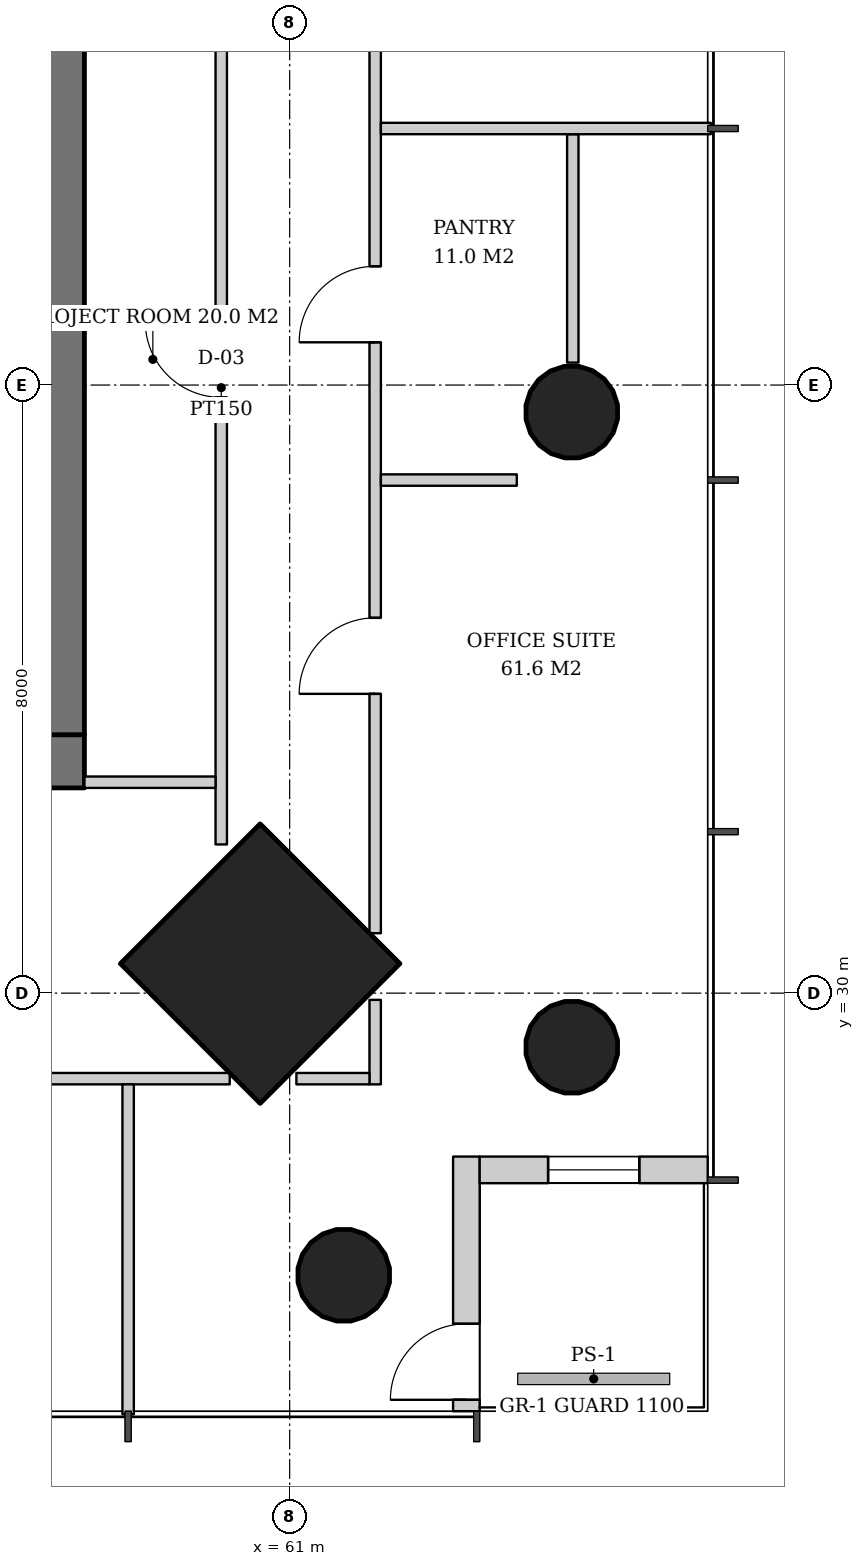
"""IFC4 building model, lengths in metres.
Left out: names, types, materials, properties, quantities, classifications, styles, units other than length and angle.
Written with IfcOpenShell. Run it as: python <this file> out.ifc"""

import sys

from ifc_helpers import new_model, si_unit, direction, frame, frame_2d, origin, origin_2d, place, context, subcontext, project, spatial, rectangle, hollow_circle, extrude, element, fill, save


model = new_model("IFC4")
c1 = context("Model", 3, precision=1e-05, world=origin(), true_north=direction((0.0, 1.0)))
c2 = subcontext(c1, "Body", "Model", "MODEL_VIEW")
j1 = project(units=[si_unit("LENGTHUNIT", "METRE"), si_unit("PLANEANGLEUNIT", "RADIAN")], contexts=[c1])
p1 = place(None, origin())
s1 = spatial("IfcSite", under=j1, at=p1, CompositionType="ELEMENT")
p2 = place(p1, origin())
s2 = spatial("IfcBuilding", under=s1, at=p2, CompositionType="ELEMENT")
p3 = place(p2, frame((0.0, 0.0, 154.0)))
s3 = spatial("IfcBuildingStorey", under=s2, at=p3, CompositionType="ELEMENT", Elevation=154.0)
p4 = place(p3, frame((64.75, 29.25, 0.0), z_axis=(-0.031898107953, 0.031898107953, 0.998981992539), x_axis=(-0.707106781187, -0.707106781187, 0.0)))
e1 = element("IfcColumn", 1, at=p4, inside=s3, PredefinedType="COLUMN", context=c2, shape_type="SweptSolid", body=[
    extrude(hollow_circle(Radius=0.61, WallThickness=0.04, at=origin_2d()), origin(), (0.0, 0.0, 1.0), 3.804),
])
p5 = place(p3, frame((64.75, 37.625, 0.0), z_axis=(-0.031910269556, 0.015987237665, 0.999362868496), x_axis=(-0.447933021895, -0.894067115991, 0.0)))
e2 = element("IfcColumn", 2, at=p5, inside=s3, PredefinedType="COLUMN", context=c2, shape_type="SweptSolid", body=[
    extrude(hollow_circle(Radius=0.61, WallThickness=0.04, at=origin_2d()), origin(), (0.0, 0.0, 1.0), 3.802),
])
p6 = place(p3, frame((60.65, 30.35, 0.0), z_axis=(-0.031898107953, 0.031898107953, 0.998981992539), x_axis=(-0.707106781187, -0.707106781187, 0.0)))
e3 = element("IfcColumn", 3, at=p6, inside=s3, PredefinedType="COLUMN", context=c2, shape_type="SweptSolid", body=[
    extrude(rectangle(XDim=2.6, YDim=2.6, at=origin_2d()), origin(), (0.0, 0.0, 1.0), 3.804),
])
p7 = place(p3, frame((61.75, 26.25, 0.0), z_axis=(-0.031898107953, 0.031898107953, 0.998981992539), x_axis=(-0.707106781187, -0.707106781187, 0.0)))
e4 = element("IfcColumn", 4, at=p7, inside=s3, PredefinedType="COLUMN", context=c2, shape_type="SweptSolid", body=[
    extrude(hollow_circle(Radius=0.61, WallThickness=0.04, at=origin_2d()), origin(), (0.0, 0.0, 1.0), 3.804),
])
p8 = place(p3, frame((31.7, 33.05, 0.0), z_axis=(0.0, 0.0, 1.0), x_axis=(1.0, 0.0, 0.0)))
e5 = element("IfcWall", 5, at=p8, inside=s3, PredefinedType="SHEAR", context=c2, shape_type="SweptSolid", body=[
    extrude(rectangle(XDim=26.6, YDim=0.7, at=frame_2d((13.3, 0.0))), origin(), (0.0, 0.0, 1.0), 3.8),
])
p9 = place(p8, frame((7.3, 0.0, 0.0)))
e6 = element("IfcOpeningElement", 6, at=p9, cuts=e5, PredefinedType="OPENING", context=c2, shape_type="SweptSolid", body=[
    extrude(rectangle(XDim=1.0, YDim=2.1, at=frame_2d((0.5, 1.05))), frame((0.0, 0.36, 0.0), z_axis=(0.0, -1.0, 0.0), x_axis=(1.0, 0.0, 0.0)), (0.0, 0.0, 1.0), 0.72),
])
p10 = place(p8, frame((18.75, 0.0, 0.0)))
e7 = element("IfcOpeningElement", 7, at=p10, cuts=e5, PredefinedType="OPENING", context=c2, shape_type="SweptSolid", body=[
    extrude(rectangle(XDim=1.0, YDim=2.1, at=frame_2d((0.5, 1.05))), frame((0.0, 0.36, 0.0), z_axis=(0.0, -1.0, 0.0), x_axis=(1.0, 0.0, 0.0)), (0.0, 0.0, 1.0), 0.72),
])
p11 = place(p8, frame((3.2, 0.0, 0.0)))
e8 = element("IfcOpeningElement", 8, at=p11, cuts=e5, PredefinedType="OPENING", context=c2, shape_type="SweptSolid", body=[
    extrude(rectangle(XDim=1.0, YDim=2.1, at=frame_2d((0.5, 1.05))), frame((0.0, 0.36, 0.0), z_axis=(0.0, -1.0, 0.0), x_axis=(1.0, 0.0, 0.0)), (0.0, 0.0, 1.0), 0.72),
])
p12 = place(p8, frame((10.42, 0.0, 0.0)))
e9 = element("IfcOpeningElement", 9, at=p12, cuts=e5, PredefinedType="OPENING", context=c2, shape_type="SweptSolid", body=[
    extrude(rectangle(XDim=1.0, YDim=2.1, at=frame_2d((0.5, 1.05))), frame((0.0, 0.36, 0.0), z_axis=(0.0, -1.0, 0.0), x_axis=(1.0, 0.0, 0.0)), (0.0, 0.0, 1.0), 0.72),
])
p13 = place(p8, frame((14.46, 0.0, 0.0)))
e10 = element("IfcOpeningElement", 10, at=p13, cuts=e5, PredefinedType="OPENING", context=c2, shape_type="SweptSolid", body=[
    extrude(rectangle(XDim=1.0, YDim=2.1, at=frame_2d((0.5, 1.05))), frame((0.0, 0.36, 0.0), z_axis=(0.0, -1.0, 0.0), x_axis=(1.0, 0.0, 0.0)), (0.0, 0.0, 1.0), 0.72),
])
p14 = place(p8, frame((22.5, 0.0, 0.0)))
e11 = element("IfcOpeningElement", 11, at=p14, cuts=e5, PredefinedType="OPENING", context=c2, shape_type="SweptSolid", body=[
    extrude(rectangle(XDim=1.0, YDim=2.1, at=frame_2d((0.5, 1.05))), frame((0.0, 0.36, 0.0), z_axis=(0.0, -1.0, 0.0), x_axis=(1.0, 0.0, 0.0)), (0.0, 0.0, 1.0), 0.72),
])
p15 = place(p3, frame((57.95, 33.4, 0.0), z_axis=(0.0, 0.0, 1.0), x_axis=(0.0, 1.0, 0.0)))
e12 = element("IfcWall", 12, at=p15, inside=s3, PredefinedType="SHEAR", context=c2, shape_type="SweptSolid", body=[
    extrude(rectangle(XDim=25.2, YDim=0.7, at=frame_2d((12.6, 0.0))), origin(), (0.0, 0.0, 1.0), 3.8),
])
p16 = place(p15, frame((11.7, 0.0, 0.0)))
e13 = element("IfcOpeningElement", 13, at=p16, cuts=e12, PredefinedType="OPENING", context=c2, shape_type="SweptSolid", body=[
    extrude(rectangle(XDim=1.8, YDim=2.4, at=frame_2d((0.9, 1.2))), frame((0.0, 0.36, 0.0), z_axis=(0.0, -1.0, 0.0), x_axis=(1.0, 0.0, 0.0)), (0.0, 0.0, 1.0), 0.72),
])
p17 = place(p3, frame((63.325, 24.5, 0.0), z_axis=(0.0, 0.0, 1.0), x_axis=(0.0, 1.0, 0.0)))
e14 = element("IfcWall", 14, at=p17, inside=s3, PredefinedType="SOLIDWALL", context=c2, shape_type="SweptSolid", body=[
    extrude(rectangle(XDim=3.35, YDim=0.35, at=frame_2d((1.675, 0.0))), origin(), (0.0, 0.0, 1.0), 3.52),
])
p18 = place(p17, frame((0.15, 0.0, 0.0)))
e15 = element("IfcOpeningElement", 15, at=p18, cuts=e14, PredefinedType="OPENING", context=c2, shape_type="SweptSolid", body=[
    extrude(rectangle(XDim=1.0, YDim=2.4, at=frame_2d((0.5, 1.2))), frame((0.0, 0.185, 0.0), z_axis=(0.0, -1.0, 0.0), x_axis=(1.0, 0.0, 0.0)), (0.0, 0.0, 1.0), 0.37),
])
p19 = place(p3, frame((63.5, 27.675, 0.0), z_axis=(0.0, 0.0, 1.0), x_axis=(1.0, 0.0, 0.0)))
e16 = element("IfcWall", 16, at=p19, inside=s3, PredefinedType="SOLIDWALL", context=c2, shape_type="SweptSolid", body=[
    extrude(rectangle(XDim=3.0, YDim=0.35, at=frame_2d((1.5, 0.0))), origin(), (0.0, 0.0, 1.0), 3.52),
])
p20 = place(p19, frame((0.9, 0.0, 0.6)))
e17 = element("IfcOpeningElement", 17, at=p20, cuts=e16, PredefinedType="OPENING", context=c2, shape_type="SweptSolid", body=[
    extrude(rectangle(XDim=1.2, YDim=2.55, at=frame_2d((0.6, 1.275))), frame((0.0, 0.185, 0.0), z_axis=(0.0, -1.0, 0.0), x_axis=(1.0, 0.0, 0.0)), (0.0, 0.0, 1.0), 0.37),
])
p21 = place(p3, frame((60.1, 31.956, 0.0), z_axis=(0.0, 0.0, 1.0), x_axis=(0.0, 1.0, 0.0)))
e18 = element("IfcWall", 18, at=p21, inside=s3, PredefinedType="PARTITIONING", context=c2, shape_type="SweptSolid", body=[
    extrude(rectangle(XDim=12.019, YDim=0.15, at=frame_2d((6.009, 0.0))), origin(), (0.0, 0.0, 1.0), 2.706),
])
p22 = place(p21, frame((5.881, 0.0, 0.0)))
e19 = element("IfcOpeningElement", 19, at=p22, cuts=e18, PredefinedType="OPENING", context=c2, shape_type="SweptSolid", body=[
    extrude(rectangle(XDim=1.0, YDim=2.1, at=frame_2d((0.5, 1.05))), frame((0.0, 0.085, 0.0), z_axis=(0.0, -1.0, 0.0), x_axis=(1.0, 0.0, 0.0)), (0.0, 0.0, 1.0), 0.17),
])
p23 = place(p3, frame((58.3, 32.775, 0.0), z_axis=(0.0, 0.0, 1.0), x_axis=(1.0, 0.0, 0.0)))
e20 = element("IfcWall", 20, at=p23, inside=s3, PredefinedType="PARTITIONING", context=c2, shape_type="SweptSolid", body=[
    extrude(rectangle(XDim=1.725, YDim=0.15, at=frame_2d((0.862, 0.0))), origin(), (0.0, 0.0, 1.0), 3.52),
])
p24 = place(p3, frame((64.725, 38.295, 0.0), z_axis=(0.0, 0.0, 1.0), x_axis=(0.0, 1.0, 0.0)))
e21 = element("IfcWall", 21, at=p24, inside=s3, PredefinedType="PARTITIONING", context=c2, shape_type="SweptSolid", body=[
    extrude(rectangle(XDim=3.005, YDim=0.15, at=frame_2d((1.502, 0.0))), origin(), (0.0, 0.0, 1.0), 3.52),
])
p25 = place(p3, frame((62.125, 28.8, 0.0), z_axis=(0.0, 0.0, 1.0), x_axis=(0.0, 1.0, 0.0)))
e22 = element("IfcWall", 22, at=p25, inside=s3, PredefinedType="PARTITIONING", context=c2, shape_type="SweptSolid", body=[
    extrude(rectangle(XDim=1.112, YDim=0.15, at=frame_2d((0.556, 0.0))), origin(), (0.0, 0.0, 1.0), 2.92),
])
p26 = place(p3, frame((62.125, 30.789, 0.0), z_axis=(0.0, 0.0, 1.0), x_axis=(0.0, 1.0, 0.0)))
e23 = element("IfcWall", 23, at=p26, inside=s3, PredefinedType="PARTITIONING", context=c2, shape_type="SweptSolid", body=[
    extrude(rectangle(XDim=30.423, YDim=0.15, at=frame_2d((15.211, 0.0))), origin(), (0.0, 0.0, 1.0), 2.706),
])
p27 = place(p26, frame((3.149, 0.0, 0.0)))
e24 = element("IfcOpeningElement", 24, at=p27, cuts=e23, PredefinedType="OPENING", context=c2, shape_type="SweptSolid", body=[
    extrude(rectangle(XDim=1.0, YDim=2.1, at=frame_2d((0.5, 1.05))), frame((0.0, 0.085, 0.0), z_axis=(0.0, -1.0, 0.0), x_axis=(1.0, 0.0, 0.0)), (0.0, 0.0, 1.0), 0.17),
])
p28 = place(p26, frame((7.774, 0.0, 0.0)))
e25 = element("IfcOpeningElement", 25, at=p28, cuts=e23, PredefinedType="OPENING", context=c2, shape_type="SweptSolid", body=[
    extrude(rectangle(XDim=1.0, YDim=2.1, at=frame_2d((0.5, 1.05))), frame((0.0, 0.085, 0.0), z_axis=(0.0, -1.0, 0.0), x_axis=(1.0, 0.0, 0.0)), (0.0, 0.0, 1.0), 0.17),
])
p29 = place(p26, frame((12.399, 0.0, 0.0)))
e26 = element("IfcOpeningElement", 26, at=p29, cuts=e23, PredefinedType="OPENING", context=c2, shape_type="SweptSolid", body=[
    extrude(rectangle(XDim=1.0, YDim=2.1, at=frame_2d((0.5, 1.05))), frame((0.0, 0.085, 0.0), z_axis=(0.0, -1.0, 0.0), x_axis=(1.0, 0.0, 0.0)), (0.0, 0.0, 1.0), 0.17),
])
p30 = place(p26, frame((17.024, 0.0, 0.0)))
e27 = element("IfcOpeningElement", 27, at=p30, cuts=e23, PredefinedType="OPENING", context=c2, shape_type="SweptSolid", body=[
    extrude(rectangle(XDim=1.0, YDim=2.1, at=frame_2d((0.5, 1.05))), frame((0.0, 0.085, 0.0), z_axis=(0.0, -1.0, 0.0), x_axis=(1.0, 0.0, 0.0)), (0.0, 0.0, 1.0), 0.17),
])
p31 = place(p26, frame((26.274, 0.0, 0.0)))
e28 = element("IfcOpeningElement", 28, at=p31, cuts=e23, PredefinedType="OPENING", context=c2, shape_type="SweptSolid", body=[
    extrude(rectangle(XDim=1.0, YDim=2.1, at=frame_2d((0.5, 1.05))), frame((0.0, 0.085, 0.0), z_axis=(0.0, -1.0, 0.0), x_axis=(1.0, 0.0, 0.0)), (0.0, 0.0, 1.0), 0.17),
])
p32 = place(p3, frame((62.2, 36.75, 0.0), z_axis=(0.0, 0.0, 1.0), x_axis=(1.0, 0.0, 0.0)))
e29 = element("IfcWall", 29, at=p32, inside=s3, PredefinedType="PARTITIONING", context=c2, shape_type="SweptSolid", body=[
    extrude(rectangle(XDim=1.788, YDim=0.15, at=frame_2d((0.894, 0.0))), origin(), (0.0, 0.0, 1.0), 3.52),
])
p33 = place(p3, frame((62.2, 41.375, 0.0), z_axis=(0.0, 0.0, 1.0), x_axis=(1.0, 0.0, 0.0)))
e30 = element("IfcWall", 30, at=p33, inside=s3, PredefinedType="PARTITIONING", context=c2, shape_type="SweptSolid", body=[
    extrude(rectangle(XDim=4.34, YDim=0.15, at=frame_2d((2.17, 0.0))), origin(), (0.0, 0.0, 1.0), 2.706),
])
p34 = place(p3, frame((29.789, 28.875, 0.0), z_axis=(0.0, 0.0, 1.0), x_axis=(1.0, 0.0, 0.0)))
e31 = element("IfcWall", 31, at=p34, inside=s3, PredefinedType="PARTITIONING", context=c2, shape_type="SweptSolid", body=[
    extrude(rectangle(XDim=30.423, YDim=0.15, at=frame_2d((15.211, 0.0))), origin(), (0.0, 0.0, 1.0), 2.706),
])
p35 = place(p34, frame((2.749, 0.0, 0.0)))
e32 = element("IfcOpeningElement", 32, at=p35, cuts=e31, PredefinedType="OPENING", context=c2, shape_type="SweptSolid", body=[
    extrude(rectangle(XDim=1.8, YDim=2.4, at=frame_2d((0.9, 1.2))), frame((0.0, 0.085, 0.0), z_axis=(0.0, -1.0, 0.0), x_axis=(1.0, 0.0, 0.0)), (0.0, 0.0, 1.0), 0.17),
])
p36 = place(p34, frame((7.374, 0.0, 0.0)))
e33 = element("IfcOpeningElement", 33, at=p36, cuts=e31, PredefinedType="OPENING", context=c2, shape_type="SweptSolid", body=[
    extrude(rectangle(XDim=1.8, YDim=2.4, at=frame_2d((0.9, 1.2))), frame((0.0, 0.085, 0.0), z_axis=(0.0, -1.0, 0.0), x_axis=(1.0, 0.0, 0.0)), (0.0, 0.0, 1.0), 0.17),
])
p37 = place(p3, frame((61.088, 28.875, 0.0), z_axis=(0.0, 0.0, 1.0), x_axis=(1.0, 0.0, 0.0)))
e34 = element("IfcWall", 34, at=p37, inside=s3, PredefinedType="PARTITIONING", context=c2, shape_type="SweptSolid", body=[
    extrude(rectangle(XDim=0.962, YDim=0.15, at=frame_2d((0.481, 0.0))), origin(), (0.0, 0.0, 1.0), 2.92),
])
p38 = place(p3, frame((58.875, 28.8, 0.0), z_axis=(0.0, 0.0, 1.0), x_axis=(0.0, -1.0, 0.0)))
e35 = element("IfcWall", 35, at=p38, inside=s3, PredefinedType="PARTITIONING", context=c2, shape_type="SweptSolid", body=[
    extrude(rectangle(XDim=4.34, YDim=0.15, at=frame_2d((2.17, 0.0))), origin(), (0.0, 0.0, 1.0), 3.52),
])
p39 = place(p18, origin())
e36 = element("IfcDoor", 36, at=p39, inside=s3, OperationType="SINGLE_SWING_LEFT", PredefinedType="DOOR", context=c2, shape_type="SweptSolid", body=[
    extrude(rectangle(XDim=1.0, YDim=2.4, at=frame_2d((0.5, 1.2))), frame((0.0, 0.025, 0.0), z_axis=(0.0, -1.0, 0.0), x_axis=(1.0, 0.0, 0.0)), (0.0, 0.0, 1.0), 0.05),
])
fill(e15, e36)
p40 = place(p20, origin())
e37 = element("IfcWindow", 37, at=p40, inside=s3, PartitioningType="SINGLE_PANEL", PredefinedType="WINDOW", context=c2, shape_type="SweptSolid", body=[
    extrude(rectangle(XDim=1.2, YDim=2.55, at=frame_2d((0.6, 1.275))), frame((0.0, 0.03, 0.0), z_axis=(0.0, -1.0, 0.0), x_axis=(1.0, 0.0, 0.0)), (0.0, 0.0, 1.0), 0.06),
])
fill(e17, e37)
p41 = place(p22, origin())
e38 = element("IfcDoor", 38, at=p41, inside=s3, OperationType="SINGLE_SWING_RIGHT", PredefinedType="DOOR", context=c2, shape_type="SweptSolid", body=[
    extrude(rectangle(XDim=1.0, YDim=2.1, at=frame_2d((0.5, 1.05))), frame((0.0, 0.025, 0.0), z_axis=(0.0, -1.0, 0.0), x_axis=(1.0, 0.0, 0.0)), (0.0, 0.0, 1.0), 0.05),
])
fill(e19, e38)
p42 = place(p27, origin())
e39 = element("IfcDoor", 39, at=p42, inside=s3, OperationType="SINGLE_SWING_LEFT", PredefinedType="DOOR", context=c2, shape_type="SweptSolid", body=[
    extrude(rectangle(XDim=1.0, YDim=2.1, at=frame_2d((0.5, 1.05))), frame((0.0, 0.025, 0.0), z_axis=(0.0, -1.0, 0.0), x_axis=(1.0, 0.0, 0.0)), (0.0, 0.0, 1.0), 0.05),
])
fill(e24, e39)
p43 = place(p28, origin())
e40 = element("IfcDoor", 40, at=p43, inside=s3, OperationType="SINGLE_SWING_LEFT", PredefinedType="DOOR", context=c2, shape_type="SweptSolid", body=[
    extrude(rectangle(XDim=1.0, YDim=2.1, at=frame_2d((0.5, 1.05))), frame((0.0, 0.025, 0.0), z_axis=(0.0, -1.0, 0.0), x_axis=(1.0, 0.0, 0.0)), (0.0, 0.0, 1.0), 0.05),
])
fill(e25, e40)
save(model, sys.argv[1])
